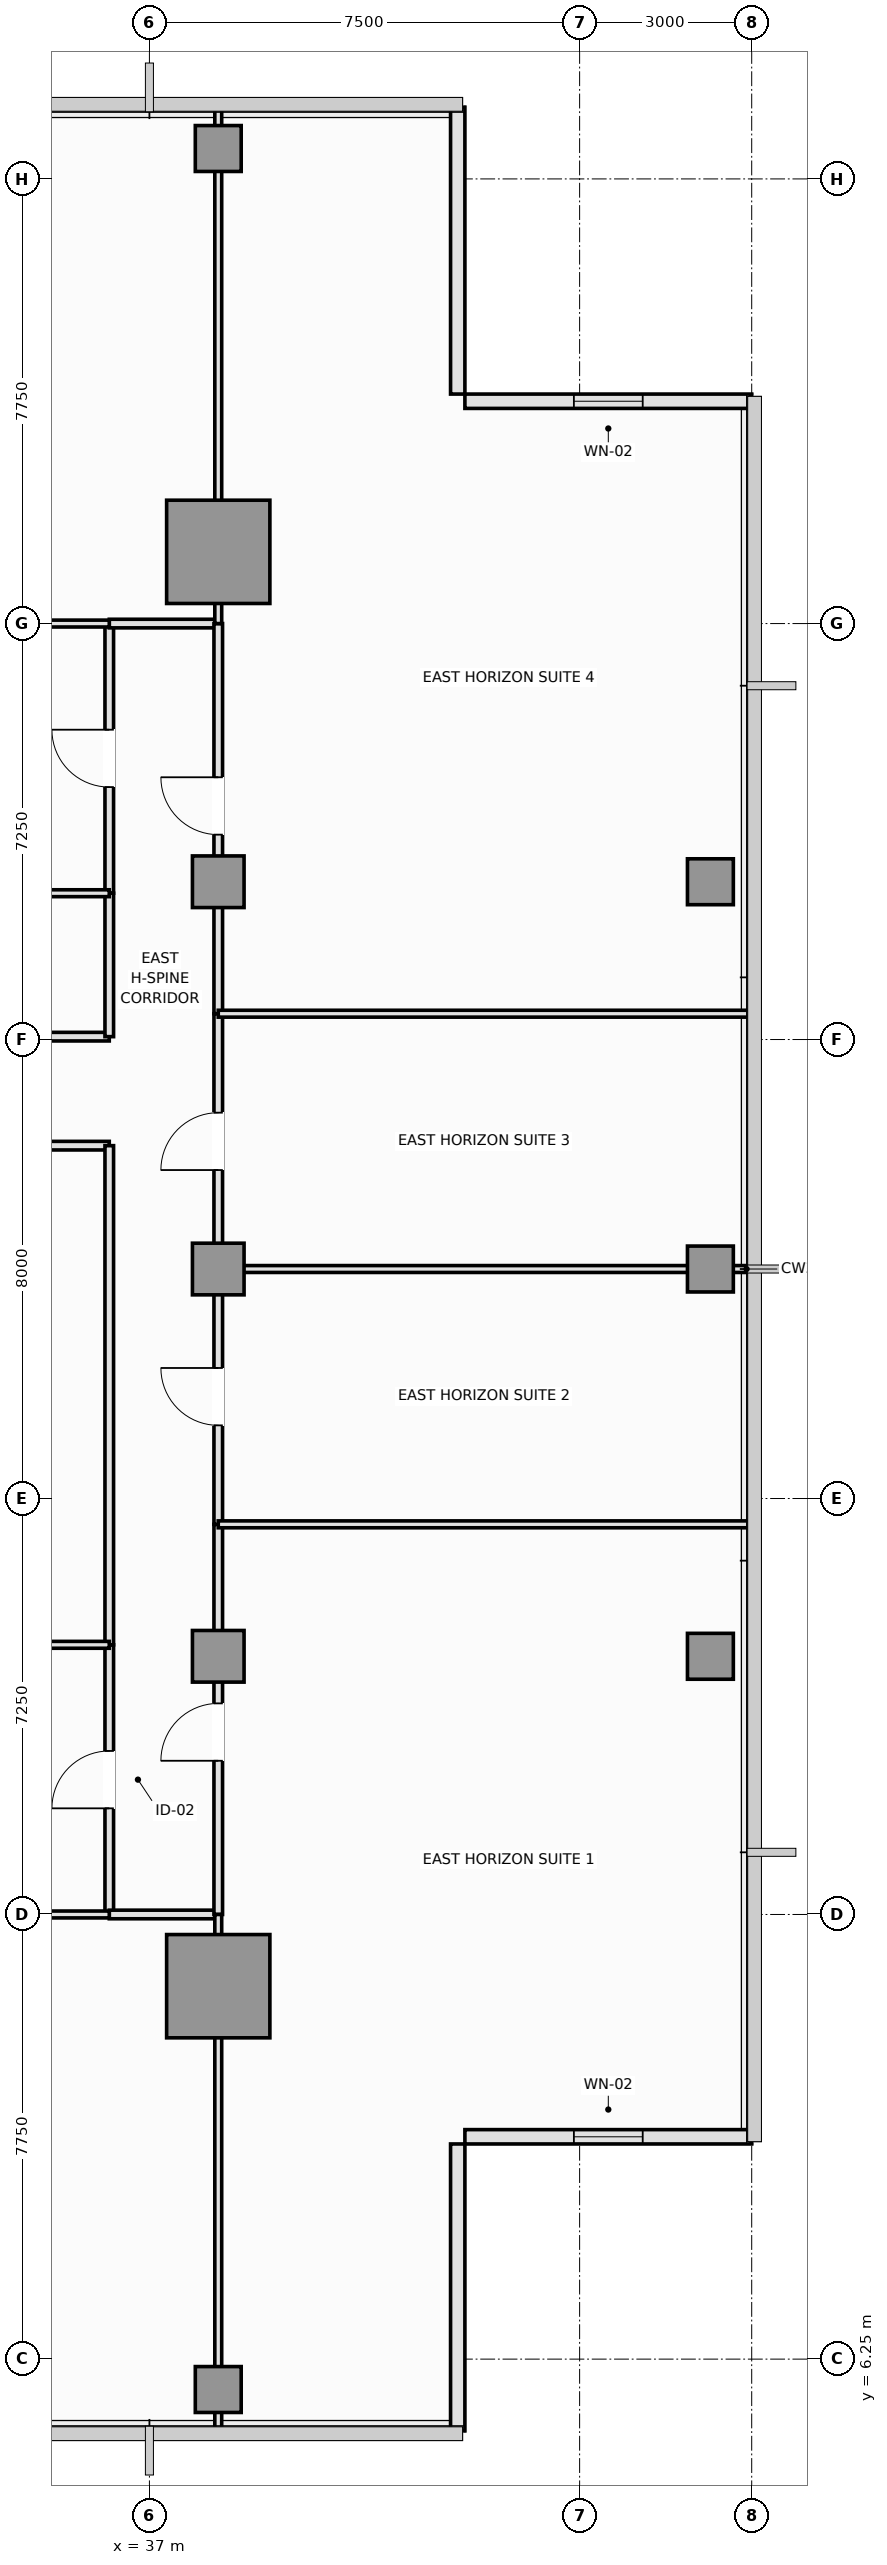
"""IFC4 building model, lengths in metres.
Left out: names, types, materials, properties, quantities, classifications, styles, units other than length and angle.
Written with IfcOpenShell. Run it as: python <this file> out.ifc"""

import sys

from ifc_helpers import new_model, si_unit, direction, frame, frame_2d, origin, origin_2d, place, context, subcontext, project, spatial, rectangle, extrude, element, fill, save


model = new_model("IFC4")
c1 = context("Model", 3, precision=1e-05, world=origin(), true_north=direction((0.0, 1.0)))
c2 = subcontext(c1, "Body", "Model", "MODEL_VIEW")
j1 = project(units=[si_unit("LENGTHUNIT", "METRE"), si_unit("PLANEANGLEUNIT", "RADIAN")], contexts=[c1])
p1 = place(None, origin())
s1 = spatial("IfcSite", under=j1, at=p1, CompositionType="ELEMENT")
p2 = place(p1, origin())
s2 = spatial("IfcBuilding", under=s1, at=p2, CompositionType="ELEMENT")
p3 = place(p2, frame((0.0, 0.0, 202.25)))
s3 = spatial("IfcBuildingStorey", under=s2, at=p3, CompositionType="ELEMENT", Elevation=202.25)
for number, where, z_axis, x_axis in (
    (1, (38.2, 12.75, 0.0), (0.0, 0.0, 1.0), (1.0, 0.0, 0.0)),
    (2, (38.2, 37.75, 0.0), (0.0, 0.0, 1.0), (1.0, 0.0, 0.0)),
):
    element("IfcColumn", number, at=place(p3, frame(where, z_axis=z_axis, x_axis=x_axis)), inside=s3, PredefinedType="COLUMN", context=c2, shape_type="SweptSolid", body=[
        extrude(rectangle(XDim=1.8, YDim=1.8, at=origin_2d()), origin(), (0.0, 0.0, 1.0), 3.55),
    ])
for number, where, z_axis, x_axis in (
    (3, (38.2, 18.5, 0.0), (0.0, 0.0, 1.0), (1.0, 0.0, 0.0)),
    (4, (38.2, 25.25, 0.0), (0.0, 0.0, 1.0), (1.0, 0.0, 0.0)),
    (5, (38.2, 32.0, 0.0), (0.0, 0.0, 1.0), (1.0, 0.0, 0.0)),
):
    element("IfcColumn", number, at=place(p3, frame(where, z_axis=z_axis, x_axis=x_axis)), inside=s3, PredefinedType="COLUMN", context=c2, shape_type="SweptSolid", body=[
        extrude(rectangle(XDim=0.9, YDim=0.9, at=origin_2d()), origin(), (0.0, 0.0, 1.0), 3.55),
    ])
for number, where, z_axis, x_axis in (
    (6, (46.78, 18.5, 0.0), (0.0, 0.0, 1.0), (1.0, 0.0, 0.0)),
    (7, (46.78, 25.25, 0.0), (0.0, 0.0, 1.0), (1.0, 0.0, 0.0)),
    (8, (46.78, 32.0, 0.0), (0.0, 0.0, 1.0), (1.0, 0.0, 0.0)),
    (9, (38.2, 5.72, 0.0), (0.0, 0.0, 1.0), (1.0, 0.0, 0.0)),
    (10, (38.2, 44.78, 0.0), (0.0, 0.0, 1.0), (1.0, 0.0, 0.0)),
):
    element("IfcColumn", number, at=place(p3, frame(where, z_axis=z_axis, x_axis=x_axis)), inside=s3, PredefinedType="COLUMN", context=c2, shape_type="SweptSolid", body=[
        extrude(rectangle(XDim=0.8, YDim=0.8, at=origin_2d()), origin(), (0.0, 0.0, 1.0), 3.55),
    ])
p4 = place(p3, frame((42.375, 5.0, 0.0), z_axis=(0.0, 0.0, 1.0), x_axis=(0.0, 1.0, 0.0)))
e11 = element("IfcWall", 11, at=p4, inside=s3, PredefinedType="SOLIDWALL", context=c2, shape_type="SweptSolid", body=[
    extrude(rectangle(XDim=5.0, YDim=0.25, at=frame_2d((2.5, 0.0))), origin(), (0.0, 0.0, 1.0), 3.37),
])
p5 = place(p3, frame((42.5, 10.125, 0.0), z_axis=(0.0, 0.0, 1.0), x_axis=(1.0, 0.0, 0.0)))
e12 = element("IfcWall", 12, at=p5, inside=s3, PredefinedType="SOLIDWALL", context=c2, shape_type="SweptSolid", body=[
    extrude(rectangle(XDim=5.0, YDim=0.25, at=frame_2d((2.5, 0.0))), origin(), (0.0, 0.0, 1.0), 3.37),
])
p6 = place(p5, frame((1.9, 0.0, 0.9)))
e13 = element("IfcOpeningElement", 13, at=p6, cuts=e12, PredefinedType="OPENING", context=c2, shape_type="SweptSolid", body=[
    extrude(rectangle(XDim=1.2, YDim=1.8, at=frame_2d((0.6, 0.9))), frame((0.0, 0.135, 0.0), z_axis=(0.0, -1.0, 0.0), x_axis=(1.0, 0.0, 0.0)), (0.0, 0.0, 1.0), 0.27),
])
p7 = place(p3, frame((47.5, 40.375, 0.0), z_axis=(0.0, 0.0, 1.0), x_axis=(-1.0, 0.0, 0.0)))
e14 = element("IfcWall", 14, at=p7, inside=s3, PredefinedType="SOLIDWALL", context=c2, shape_type="SweptSolid", body=[
    extrude(rectangle(XDim=5.0, YDim=0.25, at=frame_2d((2.5, 0.0))), origin(), (0.0, 0.0, 1.0), 3.37),
])
p8 = place(p7, frame((1.9, 0.0, 0.9)))
e15 = element("IfcOpeningElement", 15, at=p8, cuts=e14, PredefinedType="OPENING", context=c2, shape_type="SweptSolid", body=[
    extrude(rectangle(XDim=1.2, YDim=1.8, at=frame_2d((0.6, 0.9))), frame((0.0, 0.135, 0.0), z_axis=(0.0, -1.0, 0.0), x_axis=(1.0, 0.0, 0.0)), (0.0, 0.0, 1.0), 0.27),
])
p9 = place(p3, frame((42.375, 40.5, 0.0), z_axis=(0.0, 0.0, 1.0), x_axis=(0.0, 1.0, 0.0)))
e16 = element("IfcWall", 16, at=p9, inside=s3, PredefinedType="SOLIDWALL", context=c2, shape_type="SweptSolid", body=[
    extrude(rectangle(XDim=5.0, YDim=0.25, at=frame_2d((2.5, 0.0))), origin(), (0.0, 0.0, 1.0), 3.37),
])
p10 = place(p3, frame((19.9, 27.4, 0.0), z_axis=(0.0, 0.0, 1.0), x_axis=(1.0, 0.0, 0.0)))
e17 = element("IfcWall", 17, at=p10, inside=s3, PredefinedType="PARTITIONING", context=c2, shape_type="SweptSolid", body=[
    extrude(rectangle(XDim=16.4, YDim=0.15, at=frame_2d((8.2, 0.0))), origin(), (0.0, 0.0, 1.0), 3.37),
])
p11 = place(p10, frame((7.7, 0.0, 0.0)))
e18 = element("IfcOpeningElement", 18, at=p11, cuts=e17, PredefinedType="OPENING", context=c2, shape_type="SweptSolid", body=[
    extrude(rectangle(XDim=1.0, YDim=2.15, at=frame_2d((0.5, 1.075))), frame((0.0, 0.085, 0.0), z_axis=(0.0, -1.0, 0.0), x_axis=(1.0, 0.0, 0.0)), (0.0, 0.0, 1.0), 0.17),
])
p12 = place(p3, frame((19.9, 29.3, 0.0), z_axis=(0.0, 0.0, 1.0), x_axis=(1.0, 0.0, 0.0)))
e19 = element("IfcWall", 19, at=p12, inside=s3, PredefinedType="PARTITIONING", context=c2, shape_type="SweptSolid", body=[
    extrude(rectangle(XDim=16.4, YDim=0.15, at=frame_2d((8.2, 0.0))), origin(), (0.0, 0.0, 1.0), 3.37),
])
p13 = place(p12, frame((7.7, 0.0, 0.0)))
e20 = element("IfcOpeningElement", 20, at=p13, cuts=e19, PredefinedType="OPENING", context=c2, shape_type="SweptSolid", body=[
    extrude(rectangle(XDim=1.0, YDim=2.15, at=frame_2d((0.5, 1.075))), frame((0.0, 0.085, 0.0), z_axis=(0.0, -1.0, 0.0), x_axis=(1.0, 0.0, 0.0)), (0.0, 0.0, 1.0), 0.17),
])
p14 = place(p3, frame((36.3, 14.0, 0.0), z_axis=(0.0, 0.0, 1.0), x_axis=(0.0, 1.0, 0.0)))
e21 = element("IfcWall", 21, at=p14, inside=s3, PredefinedType="PARTITIONING", context=c2, shape_type="SweptSolid", body=[
    extrude(rectangle(XDim=4.7, YDim=0.15, at=frame_2d((2.35, 0.0))), origin(), (0.0, 0.0, 1.0), 3.37),
])
p15 = place(p14, frame((1.85, 0.0, 0.0)))
e22 = element("IfcOpeningElement", 22, at=p15, cuts=e21, PredefinedType="OPENING", context=c2, shape_type="SweptSolid", body=[
    extrude(rectangle(XDim=1.0, YDim=2.15, at=frame_2d((0.5, 1.075))), frame((0.0, 0.085, 0.0), z_axis=(0.0, -1.0, 0.0), x_axis=(1.0, 0.0, 0.0)), (0.0, 0.0, 1.0), 0.17),
])
p16 = place(p3, frame((36.3, 31.8, 0.0), z_axis=(0.0, 0.0, 1.0), x_axis=(0.0, 1.0, 0.0)))
e23 = element("IfcWall", 23, at=p16, inside=s3, PredefinedType="PARTITIONING", context=c2, shape_type="SweptSolid", body=[
    extrude(rectangle(XDim=4.7, YDim=0.15, at=frame_2d((2.35, 0.0))), origin(), (0.0, 0.0, 1.0), 3.37),
])
p17 = place(p16, frame((1.85, 0.0, 0.0)))
e24 = element("IfcOpeningElement", 24, at=p17, cuts=e23, PredefinedType="OPENING", context=c2, shape_type="SweptSolid", body=[
    extrude(rectangle(XDim=1.0, YDim=2.15, at=frame_2d((0.5, 1.075))), frame((0.0, 0.085, 0.0), z_axis=(0.0, -1.0, 0.0), x_axis=(1.0, 0.0, 0.0)), (0.0, 0.0, 1.0), 0.17),
])
p18 = place(p3, frame((36.3, 18.7, 0.0), z_axis=(0.0, 0.0, 1.0), x_axis=(0.0, 1.0, 0.0)))
e25 = element("IfcWall", 25, at=p18, inside=s3, PredefinedType="PARTITIONING", context=c2, shape_type="SweptSolid", body=[
    extrude(rectangle(XDim=8.7, YDim=0.15, at=frame_2d((4.35, 0.0))), origin(), (0.0, 0.0, 1.0), 3.37),
])
p19 = place(p3, frame((36.3, 29.3, 0.0), z_axis=(0.0, 0.0, 1.0), x_axis=(0.0, 1.0, 0.0)))
e26 = element("IfcWall", 26, at=p19, inside=s3, PredefinedType="PARTITIONING", context=c2, shape_type="SweptSolid", body=[
    extrude(rectangle(XDim=2.5, YDim=0.15, at=frame_2d((1.25, 0.0))), origin(), (0.0, 0.0, 1.0), 3.37),
])
for number, where, z_axis, x_axis in (
    (27, (36.3, 14.0, 0.0), (0.0, 0.0, 1.0), (1.0, 0.0, 0.0)),
    (28, (36.3, 36.5, 0.0), (0.0, 0.0, 1.0), (1.0, 0.0, 0.0)),
):
    element("IfcWall", number, at=place(p3, frame(where, z_axis=z_axis, x_axis=x_axis)), inside=s3, PredefinedType="PARTITIONING", context=c2, shape_type="SweptSolid", body=[
        extrude(rectangle(XDim=1.9, YDim=0.15, at=frame_2d((0.95, 0.0))), origin(), (0.0, 0.0, 1.0), 3.37),
    ])
p20 = place(p3, frame((38.2, 14.0, 0.0), z_axis=(0.0, 0.0, 1.0), x_axis=(0.0, 1.0, 0.0)))
e29 = element("IfcWall", 29, at=p20, inside=s3, PredefinedType="PARTITIONING", context=c2, shape_type="SweptSolid", body=[
    extrude(rectangle(XDim=6.8, YDim=0.15, at=frame_2d((3.4, 0.0))), origin(), (0.0, 0.0, 1.0), 2.92),
])
p21 = place(p20, frame((2.679, 0.0, 0.0)))
e30 = element("IfcOpeningElement", 30, at=p21, cuts=e29, PredefinedType="OPENING", context=c2, shape_type="SweptSolid", body=[
    extrude(rectangle(XDim=1.0, YDim=2.15, at=frame_2d((0.5, 1.075))), frame((0.0, 0.085, 0.0), z_axis=(0.0, -1.0, 0.0), x_axis=(1.0, 0.0, 0.0)), (0.0, 0.0, 1.0), 0.17),
])
p22 = place(p3, frame((38.2, 20.8, 0.0), z_axis=(0.0, 0.0, 1.0), x_axis=(0.0, 1.0, 0.0)))
e31 = element("IfcWall", 31, at=p22, inside=s3, PredefinedType="PARTITIONING", context=c2, shape_type="SweptSolid", body=[
    extrude(rectangle(XDim=4.45, YDim=0.15, at=frame_2d((2.225, 0.0))), origin(), (0.0, 0.0, 1.0), 2.92),
])
p23 = place(p22, frame((1.725, 0.0, 0.0)))
e32 = element("IfcOpeningElement", 32, at=p23, cuts=e31, PredefinedType="OPENING", context=c2, shape_type="SweptSolid", body=[
    extrude(rectangle(XDim=1.0, YDim=2.15, at=frame_2d((0.5, 1.075))), frame((0.0, 0.085, 0.0), z_axis=(0.0, -1.0, 0.0), x_axis=(1.0, 0.0, 0.0)), (0.0, 0.0, 1.0), 0.17),
])
p24 = place(p3, frame((38.2, 25.25, 0.0), z_axis=(0.0, 0.0, 1.0), x_axis=(0.0, 1.0, 0.0)))
e33 = element("IfcWall", 33, at=p24, inside=s3, PredefinedType="PARTITIONING", context=c2, shape_type="SweptSolid", body=[
    extrude(rectangle(XDim=4.45, YDim=0.15, at=frame_2d((2.225, 0.0))), origin(), (0.0, 0.0, 1.0), 2.92),
])
p25 = place(p24, frame((1.725, 0.0, 0.0)))
e34 = element("IfcOpeningElement", 34, at=p25, cuts=e33, PredefinedType="OPENING", context=c2, shape_type="SweptSolid", body=[
    extrude(rectangle(XDim=1.0, YDim=2.15, at=frame_2d((0.5, 1.075))), frame((0.0, 0.085, 0.0), z_axis=(0.0, -1.0, 0.0), x_axis=(1.0, 0.0, 0.0)), (0.0, 0.0, 1.0), 0.17),
])
p26 = place(p3, frame((38.2, 29.7, 0.0), z_axis=(0.0, 0.0, 1.0), x_axis=(0.0, 1.0, 0.0)))
e35 = element("IfcWall", 35, at=p26, inside=s3, PredefinedType="PARTITIONING", context=c2, shape_type="SweptSolid", body=[
    extrude(rectangle(XDim=6.8, YDim=0.15, at=frame_2d((3.4, 0.0))), origin(), (0.0, 0.0, 1.0), 2.92),
])
p27 = place(p26, frame((3.121, 0.0, 0.0)))
e36 = element("IfcOpeningElement", 36, at=p27, cuts=e35, PredefinedType="OPENING", context=c2, shape_type="SweptSolid", body=[
    extrude(rectangle(XDim=1.0, YDim=2.15, at=frame_2d((0.5, 1.075))), frame((0.0, 0.085, 0.0), z_axis=(0.0, -1.0, 0.0), x_axis=(1.0, 0.0, 0.0)), (0.0, 0.0, 1.0), 0.17),
])
for number, where, z_axis, x_axis in (
    (37, (23.5, 18.7, 0.0), (0.0, 0.0, 1.0), (1.0, 0.0, 0.0)),
    (38, (23.5, 14.0, 0.0), (0.0, 0.0, 1.0), (1.0, 0.0, 0.0)),
    (39, (23.5, 31.8, 0.0), (0.0, 0.0, 1.0), (1.0, 0.0, 0.0)),
    (40, (23.5, 36.5, 0.0), (0.0, 0.0, 1.0), (1.0, 0.0, 0.0)),
):
    element("IfcWall", number, at=place(p3, frame(where, z_axis=z_axis, x_axis=x_axis)), inside=s3, PredefinedType="PARTITIONING", context=c2, shape_type="SweptSolid", body=[
        extrude(rectangle(XDim=12.8, YDim=0.12, at=frame_2d((6.4, 0.0))), origin(), (0.0, 0.0, 1.0), 3.37),
    ])
for number, where, z_axis, x_axis in (
    (41, (38.2, 5.01, 0.0), (0.0, 0.0, 1.0), (0.0, 1.0, 0.0)),
    (42, (38.2, 36.5, 0.0), (0.0, 0.0, 1.0), (0.0, 1.0, 0.0)),
):
    element("IfcWall", number, at=place(p3, frame(where, z_axis=z_axis, x_axis=x_axis)), inside=s3, PredefinedType="PARTITIONING", context=c2, shape_type="SweptSolid", body=[
        extrude(rectangle(XDim=8.99, YDim=0.12, at=frame_2d((4.495, 0.0))), origin(), (0.0, 0.0, 1.0), 2.92),
    ])
p28 = place(p3, frame((38.2, 20.8, 0.0), z_axis=(0.0, 0.0, 1.0), x_axis=(1.0, 0.0, 0.0)))
e43 = element("IfcWall", 43, at=p28, inside=s3, PredefinedType="PARTITIONING", context=c2, shape_type="SweptSolid", body=[
    extrude(rectangle(XDim=9.29, YDim=0.12, at=frame_2d((4.645, 0.0))), origin(), (0.0, 0.0, 1.0), 3.37),
])
p29 = place(p3, frame((38.2, 25.25, 0.0), z_axis=(0.0, 0.0, 1.0), x_axis=(1.0, 0.0, 0.0)))
e44 = element("IfcWall", 44, at=p29, inside=s3, PredefinedType="PARTITIONING", context=c2, shape_type="SweptSolid", body=[
    extrude(rectangle(XDim=9.29, YDim=0.12, at=frame_2d((4.645, 0.0))), origin(), (0.0, 0.0, 1.0), 2.87),
])
p30 = place(p3, frame((38.2, 29.7, 0.0), z_axis=(0.0, 0.0, 1.0), x_axis=(1.0, 0.0, 0.0)))
e45 = element("IfcWall", 45, at=p30, inside=s3, PredefinedType="PARTITIONING", context=c2, shape_type="SweptSolid", body=[
    extrude(rectangle(XDim=9.29, YDim=0.12, at=frame_2d((4.645, 0.0))), origin(), (0.0, 0.0, 1.0), 3.37),
])
p31 = place(p6, origin())
e46 = element("IfcWindow", 46, at=p31, inside=s3, PartitioningType="SINGLE_PANEL", PredefinedType="WINDOW", context=c2, shape_type="SweptSolid", body=[
    extrude(rectangle(XDim=1.2, YDim=1.8, at=frame_2d((0.6, 0.9))), frame((0.0, 0.03, 0.0), z_axis=(0.0, -1.0, 0.0), x_axis=(1.0, 0.0, 0.0)), (0.0, 0.0, 1.0), 0.06),
])
fill(e13, e46)
p32 = place(p8, origin())
e47 = element("IfcWindow", 47, at=p32, inside=s3, PartitioningType="SINGLE_PANEL", PredefinedType="WINDOW", context=c2, shape_type="SweptSolid", body=[
    extrude(rectangle(XDim=1.2, YDim=1.8, at=frame_2d((0.6, 0.9))), frame((0.0, 0.03, 0.0), z_axis=(0.0, -1.0, 0.0), x_axis=(1.0, 0.0, 0.0)), (0.0, 0.0, 1.0), 0.06),
])
fill(e15, e47)
p33 = place(p15, origin())
e48 = element("IfcDoor", 48, at=p33, inside=s3, OperationType="SINGLE_SWING_LEFT", PredefinedType="DOOR", context=c2, shape_type="SweptSolid", body=[
    extrude(rectangle(XDim=1.0, YDim=2.15, at=frame_2d((0.5, 1.075))), frame((0.0, 0.025, 0.0), z_axis=(0.0, -1.0, 0.0), x_axis=(1.0, 0.0, 0.0)), (0.0, 0.0, 1.0), 0.05),
])
fill(e22, e48)
p34 = place(p17, origin())
e49 = element("IfcDoor", 49, at=p34, inside=s3, OperationType="SINGLE_SWING_RIGHT", PredefinedType="DOOR", context=c2, shape_type="SweptSolid", body=[
    extrude(rectangle(XDim=1.0, YDim=2.15, at=frame_2d((0.5, 1.075))), frame((0.0, 0.025, 0.0), z_axis=(0.0, -1.0, 0.0), x_axis=(1.0, 0.0, 0.0)), (0.0, 0.0, 1.0), 0.05),
])
fill(e24, e49)
p35 = place(p21, origin())
e50 = element("IfcDoor", 50, at=p35, inside=s3, OperationType="SINGLE_SWING_LEFT", PredefinedType="DOOR", context=c2, shape_type="SweptSolid", body=[
    extrude(rectangle(XDim=1.0, YDim=2.15, at=frame_2d((0.5, 1.075))), frame((0.0, 0.025, 0.0), z_axis=(0.0, -1.0, 0.0), x_axis=(1.0, 0.0, 0.0)), (0.0, 0.0, 1.0), 0.05),
])
fill(e30, e50)
p36 = place(p23, origin())
e51 = element("IfcDoor", 51, at=p36, inside=s3, OperationType="SINGLE_SWING_RIGHT", PredefinedType="DOOR", context=c2, shape_type="SweptSolid", body=[
    extrude(rectangle(XDim=1.0, YDim=2.15, at=frame_2d((0.5, 1.075))), frame((0.0, 0.025, 0.0), z_axis=(0.0, -1.0, 0.0), x_axis=(1.0, 0.0, 0.0)), (0.0, 0.0, 1.0), 0.05),
])
fill(e32, e51)
p37 = place(p25, origin())
e52 = element("IfcDoor", 52, at=p37, inside=s3, OperationType="SINGLE_SWING_LEFT", PredefinedType="DOOR", context=c2, shape_type="SweptSolid", body=[
    extrude(rectangle(XDim=1.0, YDim=2.15, at=frame_2d((0.5, 1.075))), frame((0.0, 0.025, 0.0), z_axis=(0.0, -1.0, 0.0), x_axis=(1.0, 0.0, 0.0)), (0.0, 0.0, 1.0), 0.05),
])
fill(e34, e52)
p38 = place(p27, origin())
e53 = element("IfcDoor", 53, at=p38, inside=s3, OperationType="SINGLE_SWING_RIGHT", PredefinedType="DOOR", context=c2, shape_type="SweptSolid", body=[
    extrude(rectangle(XDim=1.0, YDim=2.15, at=frame_2d((0.5, 1.075))), frame((0.0, 0.025, 0.0), z_axis=(0.0, -1.0, 0.0), x_axis=(1.0, 0.0, 0.0)), (0.0, 0.0, 1.0), 0.05),
])
fill(e36, e53)
save(model, sys.argv[1])
